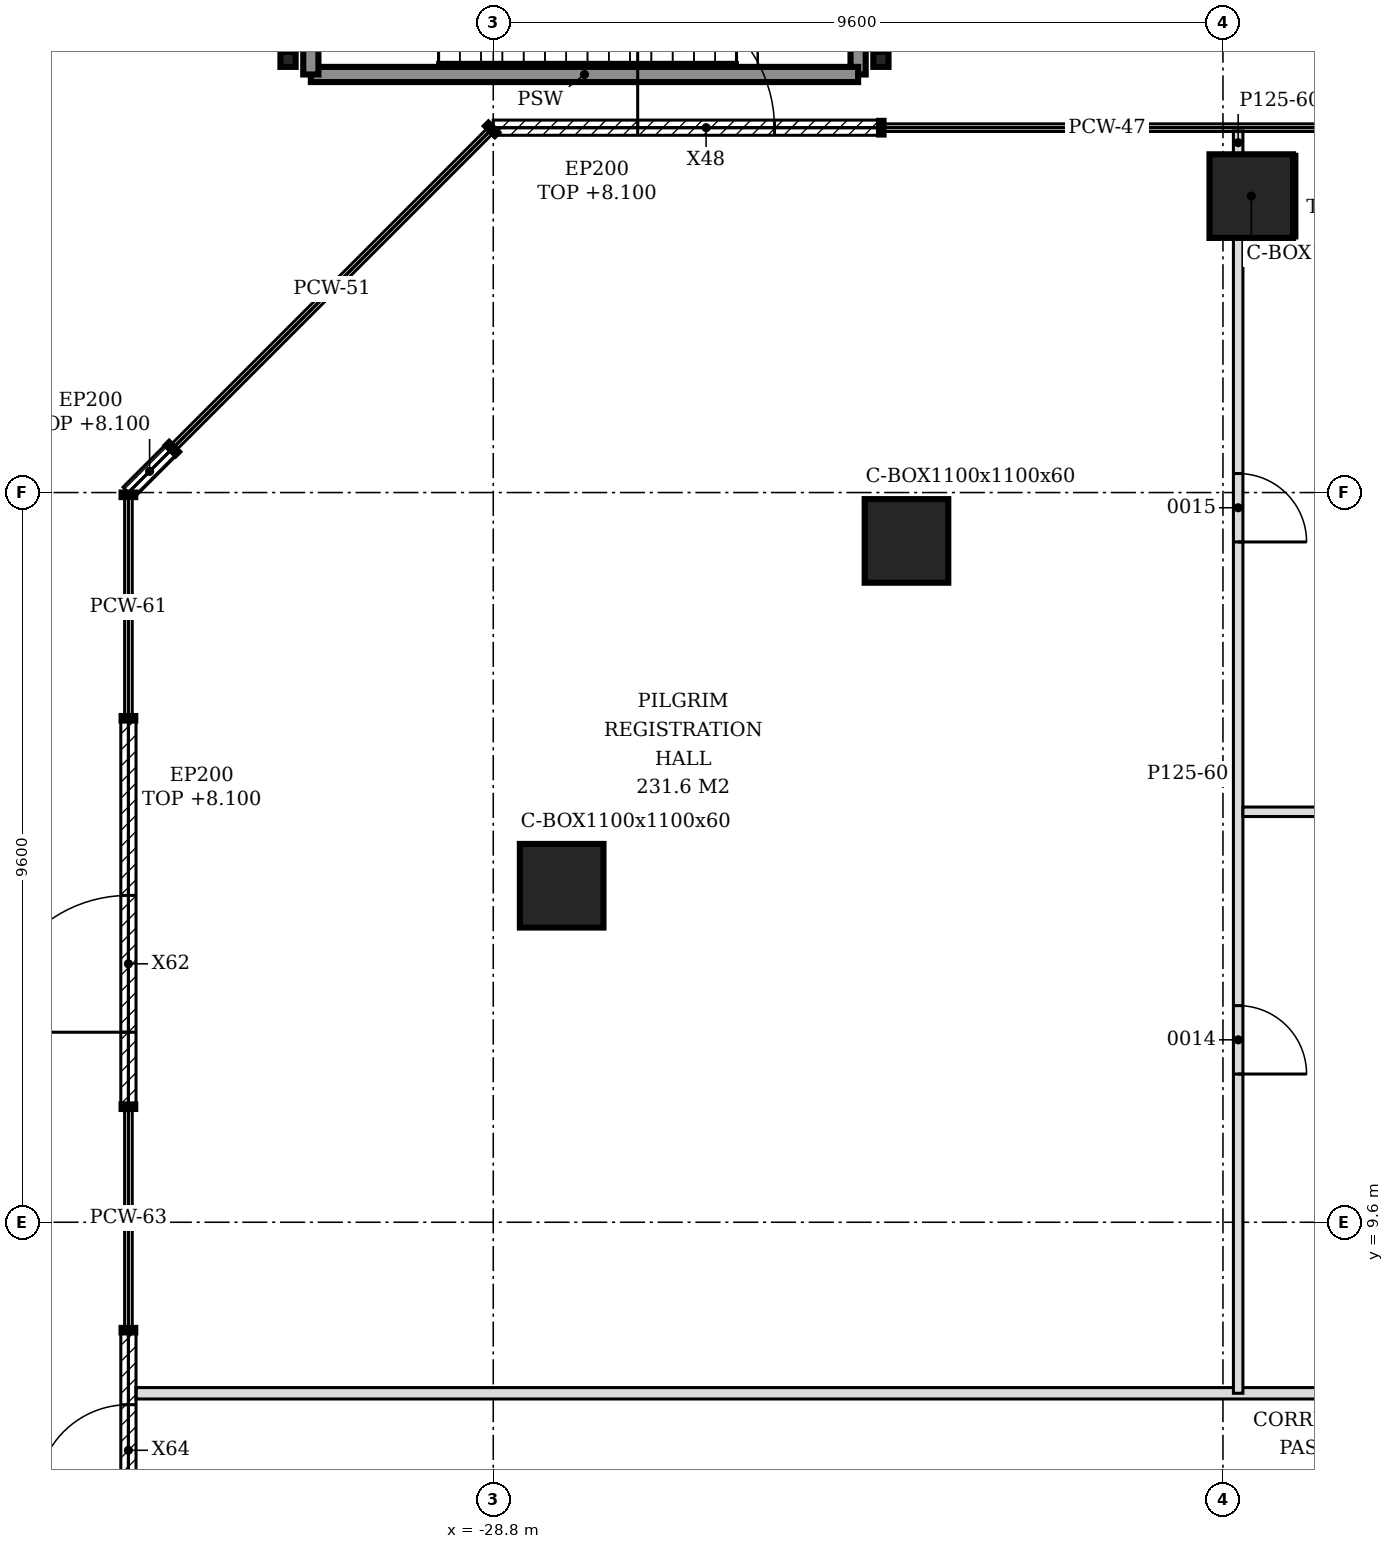
"""IFC4 building model, lengths in metres.
Left out: names, types, materials, properties, quantities, classifications, styles, units other than length and angle.
Written with IfcOpenShell. Run it as: python <this file> out.ifc"""

import sys

from ifc_helpers import new_model, si_unit, direction, frame, frame_2d, origin, origin_2d, place, context, subcontext, project, spatial, polyline, rectangle, hollow_rectangle, i_section, outline, extrude, element, fill, save


model = new_model("IFC4")
c1 = context("Model", 3, precision=1e-05, world=origin(), true_north=direction((0.0, 1.0)))
c2 = subcontext(c1, "Body", "Model", "MODEL_VIEW")
j1 = project(units=[si_unit("LENGTHUNIT", "METRE"), si_unit("PLANEANGLEUNIT", "RADIAN")], contexts=[c1])
p1 = place(None, origin())
s1 = spatial("IfcSite", under=j1, at=p1, CompositionType="ELEMENT")
p2 = place(p1, origin())
s2 = spatial("IfcBuilding", under=s1, at=p2, CompositionType="ELEMENT")
p3 = place(p2, origin())
s3 = spatial("IfcBuildingStorey", under=s2, at=p3, CompositionType="ELEMENT", Elevation=0.0)
for number, where, z_axis, x_axis in (
    (1, (-31.5, 24.9, -0.25), (0.0, 0.0, 1.0), (1.0, 0.0, 0.0)),
    (2, (-23.7, 24.9, -0.25), (0.0, 0.0, 1.0), (1.0, 0.0, 0.0)),
):
    element("IfcColumn", number, at=place(p3, frame(where, z_axis=z_axis, x_axis=x_axis)), inside=s3, PredefinedType="COLUMN", context=c2, shape_type="SweptSolid", body=[
        extrude(i_section(OverallWidth=0.2, OverallDepth=0.2, WebThickness=0.009, FlangeThickness=0.015, FilletRadius=0.018, at=origin_2d()), origin(), (0.0, 0.0, 1.0), 9.25),
    ])
for number, where, z_axis, x_axis in (
    (3, (-18.827, 23.1, -0.25), (0.0, 0.0, 1.0), (1.0, 0.0, 0.0)),
    (4, (-23.364, 18.564, -0.25), (0.0, 0.0, 1.0), (1.0, 0.0, 0.0)),
    (5, (-27.9, 14.027, -0.25), (0.0, 0.0, 1.0), (1.0, 0.0, 0.0)),
):
    element("IfcColumn", number, at=place(p3, frame(where, z_axis=z_axis, x_axis=x_axis)), inside=s3, PredefinedType="COLUMN", context=c2, shape_type="SweptSolid", body=[
        extrude(hollow_rectangle(XDim=1.1, YDim=1.1, WallThickness=0.06, at=origin_2d()), origin(), (0.0, 0.0, 1.0), 9.05),
    ])
p4 = place(p3, frame((-28.8, 24.0, 0.0), z_axis=(0.0, 0.0, 1.0), x_axis=(1.0, 0.0, 0.0)))
e6 = element("IfcWall", 6, at=p4, inside=s3, PredefinedType="SOLIDWALL", context=c2, shape_type="SweptSolid", body=[
    extrude(rectangle(XDim=5.075, YDim=0.2, at=frame_2d((2.538, 0.0))), origin(), (0.0, 0.0, 1.0), 8.1),
])
p5 = place(p4, frame((1.9, 0.0, 0.0)))
e7 = element("IfcOpeningElement", 7, at=p5, cuts=e6, PredefinedType="OPENING", context=c2, shape_type="SweptSolid", body=[
    extrude(rectangle(XDim=1.8, YDim=2.1, at=frame_2d((0.9, 1.05))), frame((0.0, 0.11, 0.0), z_axis=(0.0, -1.0, 0.0), x_axis=(1.0, 0.0, 0.0)), (0.0, 0.0, 1.0), 0.22),
])
p6 = place(p3, frame((-33.6, 19.2, 0.0), z_axis=(0.0, 0.0, 1.0), x_axis=(0.707261593831, 0.70695193464, 0.0)))
e8 = element("IfcWall", 8, at=p6, inside=s3, PredefinedType="SOLIDWALL", context=c2, shape_type="SweptSolid", body=[
    extrude(rectangle(XDim=0.788, YDim=0.2, at=frame_2d((0.394, 0.0))), origin(), (0.0, 0.0, 1.0), 8.1),
])
p7 = place(p3, frame((-33.6, 11.15, 0.0), z_axis=(0.0, 0.0, 1.0), x_axis=(0.0, 1.0, 0.0)))
e9 = element("IfcWall", 9, at=p7, inside=s3, PredefinedType="SOLIDWALL", context=c2, shape_type="SweptSolid", body=[
    extrude(rectangle(XDim=5.05, YDim=0.2, at=frame_2d((2.525, 0.0))), origin(), (0.0, 0.0, 1.0), 8.1),
])
p8 = place(p7, frame((0.95, 0.0, 0.0)))
e10 = element("IfcOpeningElement", 10, at=p8, cuts=e9, PredefinedType="OPENING", context=c2, shape_type="SweptSolid", body=[
    extrude(rectangle(XDim=1.8, YDim=2.1, at=frame_2d((0.9, 1.05))), frame((0.0, 0.11, 0.0), z_axis=(0.0, -1.0, 0.0), x_axis=(1.0, 0.0, 0.0)), (0.0, 0.0, 1.0), 0.22),
])
p9 = place(p3, frame((-33.6, 4.95, 0.0), z_axis=(0.0, 0.0, 1.0), x_axis=(0.0, 1.0, 0.0)))
e11 = element("IfcWall", 11, at=p9, inside=s3, PredefinedType="SOLIDWALL", context=c2, shape_type="SweptSolid", body=[
    extrude(rectangle(XDim=3.2, YDim=0.2, at=frame_2d((1.6, 0.0))), origin(), (0.0, 0.0, 1.0), 8.1),
])
p10 = place(p9, frame((1.05, 0.0, 0.0)))
e12 = element("IfcOpeningElement", 12, at=p10, cuts=e11, PredefinedType="OPENING", context=c2, shape_type="SweptSolid", body=[
    extrude(rectangle(XDim=1.2, YDim=2.1, at=frame_2d((0.6, 1.05))), frame((0.0, 0.11, 0.0), z_axis=(0.0, -1.0, 0.0), x_axis=(1.0, 0.0, 0.0)), (0.0, 0.0, 1.0), 0.22),
])
for number, where, z_axis, x_axis in (
    (13, (-31.2, 24.7, 0.0), (0.0, 0.0, 1.0), (0.0, 1.0, 0.0)),
    (14, (-24.0, 28.05, 0.0), (0.0, 0.0, 1.0), (0.0, -1.0, 0.0)),
):
    element("IfcWall", number, at=place(p3, frame(where, z_axis=z_axis, x_axis=x_axis)), inside=s3, PredefinedType="SOLIDWALL", context=c2, shape_type="SweptSolid", body=[
        extrude(rectangle(XDim=3.35, YDim=0.2, at=frame_2d((1.675, 0.0))), origin(), (0.0, 0.0, 1.0), 8.8),
    ])
p11 = place(p3, frame((-24.0, 24.7, 0.0), z_axis=(0.0, 0.0, 1.0), x_axis=(-1.0, 0.0, 0.0)))
e15 = element("IfcWall", 15, at=p11, inside=s3, PredefinedType="SOLIDWALL", context=c2, shape_type="SweptSolid", body=[
    extrude(rectangle(XDim=7.2, YDim=0.2, at=frame_2d((3.6, 0.0))), origin(), (0.0, 0.0, 1.0), 8.8),
])
p12 = place(p3, frame((-33.5, 7.35, 0.0), z_axis=(0.0, 0.0, 1.0), x_axis=(1.0, 0.0, 0.0)))
e16 = element("IfcWall", 16, at=p12, inside=s3, PredefinedType="SOLIDWALL", context=c2, shape_type="SweptSolid", body=[
    extrude(rectangle(XDim=31.6, YDim=0.15, at=frame_2d((15.8, 0.0))), origin(), (0.0, 0.0, 1.0), 8.8),
])
p13 = place(p3, frame((-19.0, 7.35, 0.0), z_axis=(0.0, 0.0, 1.0), x_axis=(0.0, 1.0, 0.0)))
e17 = element("IfcWall", 17, at=p13, inside=s3, PredefinedType="PARTITIONING", context=c2, shape_type="SweptSolid", body=[
    extrude(outline(polyline([(0.0, 0.0), (15.2, 0.0), (15.2, 8.8), (2.4, 8.8), (2.398, 7.98), (2.1, 7.98), (2.098, 8.8), (0.0, 8.8), (0.0, 0.0)])), frame((0.0, 0.062, 0.0), z_axis=(0.0, -1.0, 0.0), x_axis=(1.0, 0.0, 0.0)), (0.0, 0.0, 1.0), 0.125),
])
p14 = place(p13, frame((4.2, 0.0, 0.0)))
e18 = element("IfcOpeningElement", 18, at=p14, cuts=e17, PredefinedType="OPENING", context=c2, shape_type="SweptSolid", body=[
    extrude(rectangle(XDim=0.9, YDim=2.1, at=frame_2d((0.45, 1.05))), frame((0.0, 0.073, 0.0), z_axis=(0.0, -1.0, 0.0), x_axis=(1.0, 0.0, 0.0)), (0.0, 0.0, 1.0), 0.145),
])
p15 = place(p13, frame((11.2, 0.0, 0.0)))
e19 = element("IfcOpeningElement", 19, at=p15, cuts=e17, PredefinedType="OPENING", context=c2, shape_type="SweptSolid", body=[
    extrude(rectangle(XDim=0.9, YDim=2.1, at=frame_2d((0.45, 1.05))), frame((0.0, 0.073, 0.0), z_axis=(0.0, -1.0, 0.0), x_axis=(1.0, 0.0, 0.0)), (0.0, 0.0, 1.0), 0.145),
])
p16 = place(p3, frame((-18.938, 15.0, 0.0), z_axis=(0.0, 0.0, 1.0), x_axis=(1.0, 0.0, 0.0)))
e20 = element("IfcWall", 20, at=p16, inside=s3, PredefinedType="PARTITIONING", context=c2, shape_type="SweptSolid", body=[
    extrude(outline(polyline([(0.0, 0.0), (16.6, 0.0), (16.6, 8.8), (14.238, 8.8), (14.236, 8.28), (14.038, 8.28), (14.035, 8.8), (9.448, 8.8), (9.446, 8.18), (9.228, 8.18), (9.226, 8.8), (4.637, 8.8), (4.635, 8.28), (4.438, 8.28), (4.436, 8.8), (0.0, 8.8), (0.0, 0.0)])), frame((0.0, 0.062, 0.0), z_axis=(0.0, -1.0, 0.0), x_axis=(1.0, 0.0, 0.0)), (0.0, 0.0, 1.0), 0.125),
])
p17 = place(p16, frame((15.488, 0.0, 0.0)))
e21 = element("IfcOpeningElement", 21, at=p17, cuts=e20, PredefinedType="OPENING", context=c2, shape_type="SweptSolid", body=[
    extrude(rectangle(XDim=0.9, YDim=2.1, at=frame_2d((0.45, 1.05))), frame((0.0, 0.073, 0.0), z_axis=(0.0, -1.0, 0.0), x_axis=(1.0, 0.0, 0.0)), (0.0, 0.0, 1.0), 0.145),
])
p18 = place(p3, frame((-19.0, 23.65, 0.0), z_axis=(0.0, 0.0, 1.0), x_axis=(0.0, 1.0, 0.0)))
e22 = element("IfcWall", 22, at=p18, inside=s3, PredefinedType="PARTITIONING", context=c2, shape_type="SweptSolid", body=[
    extrude(rectangle(XDim=0.306, YDim=0.125, at=frame_2d((0.153, 0.0))), origin(), (0.0, 0.0, 1.0), 8.8),
])
p19 = place(p3, frame((-18.252, 22.55, 0.0), z_axis=(0.0, 0.0, 1.0), x_axis=(0.0, 1.0, 0.0)))
e23 = element("IfcWall", 23, at=p19, inside=s3, PredefinedType="PARTITIONING", context=c2, shape_type="SweptSolid", body=[
    extrude(rectangle(XDim=1.1, YDim=0.05, at=frame_2d((0.55, 0.0))), origin(), (0.0, 0.0, 1.0), 8.18),
])
p20 = place(p5, origin())
e24 = element("IfcDoor", 24, at=p20, inside=s3, OperationType="SINGLE_SWING_LEFT", PredefinedType="DOOR", context=c2, shape_type="SweptSolid", body=[
    extrude(rectangle(XDim=1.8, YDim=2.1, at=frame_2d((0.9, 1.05))), frame((0.0, 0.025, 0.0), z_axis=(0.0, -1.0, 0.0), x_axis=(1.0, 0.0, 0.0)), (0.0, 0.0, 1.0), 0.05),
])
fill(e7, e24)
p21 = place(p8, origin())
e25 = element("IfcDoor", 25, at=p21, inside=s3, OperationType="SINGLE_SWING_LEFT", PredefinedType="DOOR", context=c2, shape_type="SweptSolid", body=[
    extrude(rectangle(XDim=1.8, YDim=2.1, at=frame_2d((0.9, 1.05))), frame((0.0, 0.025, 0.0), z_axis=(0.0, -1.0, 0.0), x_axis=(1.0, 0.0, 0.0)), (0.0, 0.0, 1.0), 0.05),
])
fill(e10, e25)
p22 = place(p10, origin())
e26 = element("IfcDoor", 26, at=p22, inside=s3, OperationType="SINGLE_SWING_LEFT", PredefinedType="DOOR", context=c2, shape_type="SweptSolid", body=[
    extrude(rectangle(XDim=1.2, YDim=2.1, at=frame_2d((0.6, 1.05))), frame((0.0, 0.025, 0.0), z_axis=(0.0, -1.0, 0.0), x_axis=(1.0, 0.0, 0.0)), (0.0, 0.0, 1.0), 0.05),
])
fill(e12, e26)
p23 = place(p14, frame((0.9, 0.0, 0.0), z_axis=(0.0, 0.0, 1.0), x_axis=(-1.0, 0.0, 0.0)))
e27 = element("IfcDoor", 27, at=p23, inside=s3, OperationType="SINGLE_SWING_RIGHT", PredefinedType="DOOR", context=c2, shape_type="SweptSolid", body=[
    extrude(rectangle(XDim=0.9, YDim=2.1, at=frame_2d((0.45, 1.05))), frame((0.0, 0.025, 0.0), z_axis=(0.0, -1.0, 0.0), x_axis=(1.0, 0.0, 0.0)), (0.0, 0.0, 1.0), 0.05),
])
fill(e18, e27)
p24 = place(p15, frame((0.9, 0.0, 0.0), z_axis=(0.0, 0.0, 1.0), x_axis=(-1.0, 0.0, 0.0)))
e28 = element("IfcDoor", 28, at=p24, inside=s3, OperationType="SINGLE_SWING_RIGHT", PredefinedType="DOOR", context=c2, shape_type="SweptSolid", body=[
    extrude(rectangle(XDim=0.9, YDim=2.1, at=frame_2d((0.45, 1.05))), frame((0.0, 0.025, 0.0), z_axis=(0.0, -1.0, 0.0), x_axis=(1.0, 0.0, 0.0)), (0.0, 0.0, 1.0), 0.05),
])
fill(e19, e28)
save(model, sys.argv[1])
